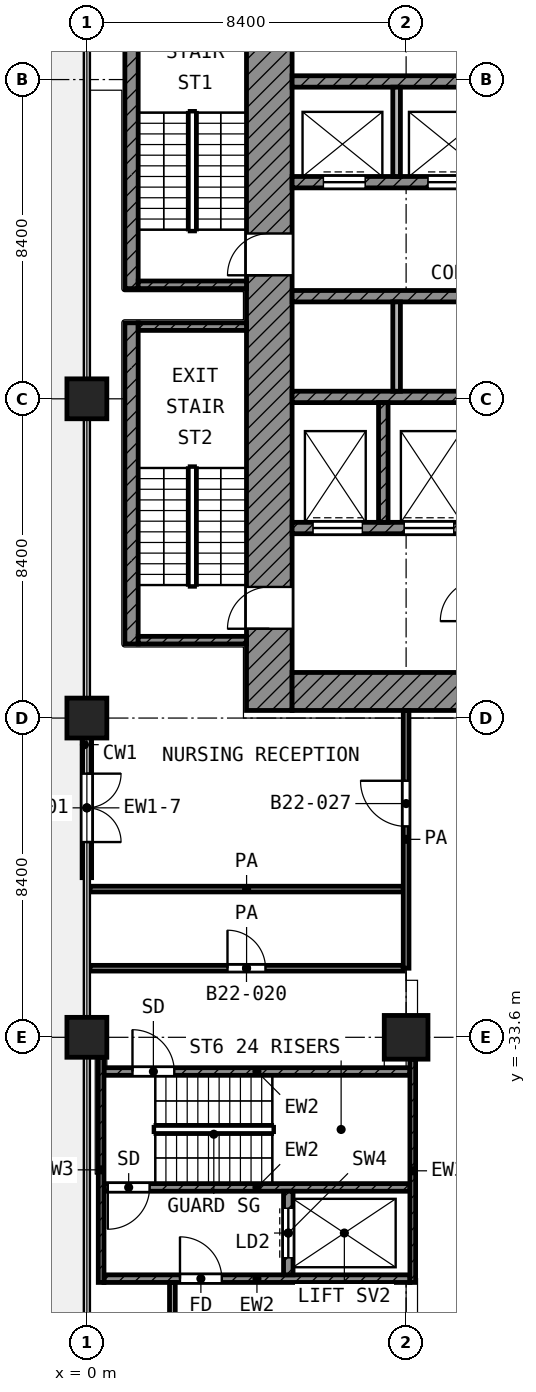
"""IFC4 building model, lengths in metres.
Left out: names, types, materials, properties, quantities, classifications, styles, units other than length and angle.
Written with IfcOpenShell. Run it as: python <this file> out.ifc"""

import sys

from ifc_helpers import new_model, si_unit, direction, frame, frame_2d, origin, origin_2d, place, context, subcontext, project, spatial, rectangle, extrude, element, fill, save


model = new_model("IFC4")
c1 = context("Model", 3, precision=1e-05, world=origin(), true_north=direction((0.0, 1.0)))
c2 = subcontext(c1, "Body", "Model", "MODEL_VIEW")
j1 = project(units=[si_unit("LENGTHUNIT", "METRE"), si_unit("PLANEANGLEUNIT", "RADIAN")], contexts=[c1])
p1 = place(None, origin())
s1 = spatial("IfcSite", under=j1, at=p1, CompositionType="ELEMENT")
p2 = place(p1, origin())
s2 = spatial("IfcBuilding", under=s1, at=p2, CompositionType="ELEMENT")
p3 = place(p2, frame((0.0, 0.0, 98.8)))
s3 = spatial("IfcBuildingStorey", under=s2, at=p3, CompositionType="ELEMENT", Elevation=98.8)
for number, where, z_axis, x_axis in (
    (1, (0.0, -16.8, 0.0), (0.0, 0.0, 1.0), (1.0, 0.0, 0.0)),
    (2, (0.0, -25.2, 0.0), (0.0, 0.0, 1.0), (1.0, 0.0, 0.0)),
    (3, (0.0, -33.6, 0.0), (0.0, 0.0, 1.0), (1.0, 0.0, 0.0)),
):
    element("IfcColumn", number, at=place(p3, frame(where, z_axis=z_axis, x_axis=x_axis)), inside=s3, PredefinedType="COLUMN", context=c2, shape_type="SweptSolid", body=[
        extrude(rectangle(XDim=1.05, YDim=1.05, at=origin_2d()), origin(), (0.0, 0.0, 1.0), 4.2),
    ])
p4 = place(p3, frame((8.4, -33.6, 0.0), z_axis=(0.0, 0.0, 1.0), x_axis=(1.0, 0.0, 0.0)))
e4 = element("IfcColumn", 4, at=p4, inside=s3, PredefinedType="COLUMN", context=c2, shape_type="SweptSolid", body=[
    extrude(rectangle(XDim=1.15, YDim=1.15, at=origin_2d()), origin(), (0.0, 0.0, 1.0), 4.2),
])
p5 = place(p3, frame((0.0, -25.725, 0.0), z_axis=(0.0, 0.0, 1.0), x_axis=(0.0, -1.0, 0.0)))
e5 = element("IfcWall", 5, at=p5, inside=s3, PredefinedType="SOLIDWALL", context=c2, shape_type="SweptSolid", body=[
    extrude(rectangle(XDim=3.675, YDim=0.25, at=frame_2d((1.837, 0.0))), origin(), (0.0, 0.0, 1.0), 3.48),
])
p6 = place(p5, frame((0.938, 0.0, 0.0)))
e6 = element("IfcOpeningElement", 6, at=p6, cuts=e5, PredefinedType="OPENING", context=c2, shape_type="SweptSolid", body=[
    extrude(rectangle(XDim=1.8, YDim=2.1, at=frame_2d((0.9, 1.05))), frame((0.0, 0.135, 0.0), z_axis=(0.0, -1.0, 0.0), x_axis=(1.0, 0.0, 0.0)), (0.0, 0.0, 1.0), 0.27),
])
p7 = place(p3, frame((4.8, -25.0, 0.0), z_axis=(0.0, 0.0, 1.0), x_axis=(0.0, 1.0, 0.0)))
e7 = element("IfcWall", 7, at=p7, inside=s3, PredefinedType="SHEAR", context=c2, shape_type="SweptSolid", body=[
    extrude(rectangle(XDim=19.6, YDim=1.2, at=frame_2d((9.8, 0.0))), origin(), (0.0, 0.0, 1.0), 3.6),
])
p8 = place(p7, frame((11.45, 0.0, 0.0)))
e8 = element("IfcOpeningElement", 8, at=p8, cuts=e7, PredefinedType="OPENING", context=c2, shape_type="SweptSolid", body=[
    extrude(rectangle(XDim=1.1, YDim=2.1, at=frame_2d((0.55, 1.05))), frame((0.0, 0.61, 0.0), z_axis=(0.0, -1.0, 0.0), x_axis=(1.0, 0.0, 0.0)), (0.0, 0.0, 1.0), 1.22),
])
p9 = place(p7, frame((2.15, 0.0, 0.0)))
e9 = element("IfcOpeningElement", 9, at=p9, cuts=e7, PredefinedType="OPENING", context=c2, shape_type="SweptSolid", body=[
    extrude(rectangle(XDim=1.1, YDim=2.1, at=frame_2d((0.55, 1.05))), frame((0.0, 0.61, 0.0), z_axis=(0.0, -1.0, 0.0), x_axis=(1.0, 0.0, 0.0)), (0.0, 0.0, 1.0), 1.22),
])
p10 = place(p3, frame((5.4, -24.5, 0.0), z_axis=(0.0, 0.0, 1.0), x_axis=(1.0, 0.0, 0.0)))
e10 = element("IfcWall", 10, at=p10, inside=s3, PredefinedType="SHEAR", context=c2, shape_type="SweptSolid", body=[
    extrude(rectangle(XDim=18.6, YDim=1.0, at=frame_2d((9.3, 0.0))), origin(), (0.0, 0.0, 1.0), 3.6),
])
p11 = place(p10, frame((6.3, 0.0, 0.0)))
e11 = element("IfcOpeningElement", 11, at=p11, cuts=e10, PredefinedType="OPENING", context=c2, shape_type="SweptSolid", body=[
    extrude(rectangle(XDim=1.8, YDim=2.1, at=frame_2d((0.9, 1.05))), frame((0.0, 0.51, 0.0), z_axis=(0.0, -1.0, 0.0), x_axis=(1.0, 0.0, 0.0)), (0.0, 0.0, 1.0), 1.02),
])
p12 = place(p3, frame((5.4, -8.45, 0.0), z_axis=(0.0, 0.0, 1.0), x_axis=(1.0, 0.0, 0.0)))
e12 = element("IfcWall", 12, at=p12, inside=s3, PredefinedType="SHEAR", context=c2, shape_type="SweptSolid", body=[
    extrude(rectangle(XDim=16.65, YDim=0.3, at=frame_2d((8.325, 0.0))), origin(), (0.0, 0.0, 1.0), 3.6),
])
p13 = place(p3, frame((5.4, -11.1, 0.0), z_axis=(0.0, 0.0, 1.0), x_axis=(1.0, 0.0, 0.0)))
e13 = element("IfcWall", 13, at=p13, inside=s3, PredefinedType="SHEAR", context=c2, shape_type="SweptSolid", body=[
    extrude(rectangle(XDim=16.65, YDim=0.3, at=frame_2d((8.325, 0.0))), origin(), (0.0, 0.0, 1.0), 3.6),
])
p14 = place(p13, frame((0.825, 0.0, 0.0)))
e14 = element("IfcOpeningElement", 14, at=p14, cuts=e13, PredefinedType="OPENING", context=c2, shape_type="SweptSolid", body=[
    extrude(rectangle(XDim=1.1, YDim=2.1, at=frame_2d((0.55, 1.05))), frame((0.0, 0.16, 0.0), z_axis=(0.0, -1.0, 0.0), x_axis=(1.0, 0.0, 0.0)), (0.0, 0.0, 1.0), 0.32),
])
p15 = place(p13, frame((3.575, 0.0, 0.0)))
e15 = element("IfcOpeningElement", 15, at=p15, cuts=e13, PredefinedType="OPENING", context=c2, shape_type="SweptSolid", body=[
    extrude(rectangle(XDim=1.1, YDim=2.1, at=frame_2d((0.55, 1.05))), frame((0.0, 0.16, 0.0), z_axis=(0.0, -1.0, 0.0), x_axis=(1.0, 0.0, 0.0)), (0.0, 0.0, 1.0), 0.32),
])
p16 = place(p13, frame((6.325, 0.0, 0.0)))
e16 = element("IfcOpeningElement", 16, at=p16, cuts=e13, PredefinedType="OPENING", context=c2, shape_type="SweptSolid", body=[
    extrude(rectangle(XDim=1.1, YDim=2.1, at=frame_2d((0.55, 1.05))), frame((0.0, 0.16, 0.0), z_axis=(0.0, -1.0, 0.0), x_axis=(1.0, 0.0, 0.0)), (0.0, 0.0, 1.0), 0.32),
])
p17 = place(p13, frame((9.075, 0.0, 0.0)))
e17 = element("IfcOpeningElement", 17, at=p17, cuts=e13, PredefinedType="OPENING", context=c2, shape_type="SweptSolid", body=[
    extrude(rectangle(XDim=1.1, YDim=2.1, at=frame_2d((0.55, 1.05))), frame((0.0, 0.16, 0.0), z_axis=(0.0, -1.0, 0.0), x_axis=(1.0, 0.0, 0.0)), (0.0, 0.0, 1.0), 0.32),
])
for number, where, z_axis, x_axis in (
    (18, (5.4, -14.1, 0.0), (0.0, 0.0, 1.0), (1.0, 0.0, 0.0)),
    (19, (5.4, -16.75, 0.0), (0.0, 0.0, 1.0), (1.0, 0.0, 0.0)),
):
    element("IfcWall", number, at=place(p3, frame(where, z_axis=z_axis, x_axis=x_axis)), inside=s3, PredefinedType="SHEAR", context=c2, shape_type="SweptSolid", body=[
        extrude(rectangle(XDim=16.65, YDim=0.3, at=frame_2d((8.325, 0.0))), origin(), (0.0, 0.0, 1.0), 3.6),
    ])
p18 = place(p3, frame((5.4, -20.2, 0.0), z_axis=(0.0, 0.0, 1.0), x_axis=(1.0, 0.0, 0.0)))
e20 = element("IfcWall", 20, at=p18, inside=s3, PredefinedType="SHEAR", context=c2, shape_type="SweptSolid", body=[
    extrude(rectangle(XDim=14.65, YDim=0.3, at=frame_2d((7.325, 0.0))), origin(), (0.0, 0.0, 1.0), 3.6),
])
p19 = place(p18, frame((10.55, 0.0, 0.0)))
e21 = element("IfcOpeningElement", 21, at=p19, cuts=e20, PredefinedType="OPENING", context=c2, shape_type="SweptSolid", body=[
    extrude(rectangle(XDim=1.3, YDim=2.1, at=frame_2d((0.65, 1.05))), frame((0.0, 0.16, 0.0), z_axis=(0.0, -1.0, 0.0), x_axis=(1.0, 0.0, 0.0)), (0.0, 0.0, 1.0), 0.32),
])
p20 = place(p18, frame((12.95, 0.0, 0.0)))
e22 = element("IfcOpeningElement", 22, at=p20, cuts=e20, PredefinedType="OPENING", context=c2, shape_type="SweptSolid", body=[
    extrude(rectangle(XDim=1.3, YDim=2.1, at=frame_2d((0.65, 1.05))), frame((0.0, 0.16, 0.0), z_axis=(0.0, -1.0, 0.0), x_axis=(1.0, 0.0, 0.0)), (0.0, 0.0, 1.0), 0.32),
])
p21 = place(p18, frame((0.55, 0.0, 0.0)))
e23 = element("IfcOpeningElement", 23, at=p21, cuts=e20, PredefinedType="OPENING", context=c2, shape_type="SweptSolid", body=[
    extrude(rectangle(XDim=1.3, YDim=2.1, at=frame_2d((0.65, 1.05))), frame((0.0, 0.16, 0.0), z_axis=(0.0, -1.0, 0.0), x_axis=(1.0, 0.0, 0.0)), (0.0, 0.0, 1.0), 0.32),
])
p22 = place(p18, frame((2.95, 0.0, 0.0)))
e24 = element("IfcOpeningElement", 24, at=p22, cuts=e20, PredefinedType="OPENING", context=c2, shape_type="SweptSolid", body=[
    extrude(rectangle(XDim=1.3, YDim=2.1, at=frame_2d((0.65, 1.05))), frame((0.0, 0.16, 0.0), z_axis=(0.0, -1.0, 0.0), x_axis=(1.0, 0.0, 0.0)), (0.0, 0.0, 1.0), 0.32),
])
p23 = place(p18, frame((7.15, 0.0, 0.0)))
e25 = element("IfcOpeningElement", 25, at=p23, cuts=e20, PredefinedType="OPENING", context=c2, shape_type="SweptSolid", body=[
    extrude(rectangle(XDim=0.9, YDim=2.1, at=frame_2d((0.45, 1.05))), frame((0.0, 0.16, 0.0), z_axis=(0.0, -1.0, 0.0), x_axis=(1.0, 0.0, 0.0)), (0.0, 0.0, 1.0), 0.32),
])
p24 = place(p3, frame((7.8, -20.05, 0.0), z_axis=(0.0, 0.0, 1.0), x_axis=(0.0, 1.0, 0.0)))
e26 = element("IfcWall", 26, at=p24, inside=s3, PredefinedType="SHEAR", context=c2, shape_type="SweptSolid", body=[
    extrude(rectangle(XDim=3.15, YDim=0.25, at=frame_2d((1.575, 0.0))), origin(), (0.0, 0.0, 1.0), 3.6),
])
p25 = place(p3, frame((8.15, -10.95, 0.0), z_axis=(0.0, 0.0, 1.0), x_axis=(0.0, 1.0, 0.0)))
e27 = element("IfcWall", 27, at=p25, inside=s3, PredefinedType="PARTITIONING", context=c2, shape_type="SweptSolid", body=[
    extrude(rectangle(XDim=2.35, YDim=0.2, at=frame_2d((1.175, 0.0))), origin(), (0.0, 0.0, 1.0), 3.6),
])
p26 = place(p3, frame((8.15, -16.6, 0.0), z_axis=(0.0, 0.0, 1.0), x_axis=(0.0, 1.0, 0.0)))
e28 = element("IfcWall", 28, at=p26, inside=s3, PredefinedType="PARTITIONING", context=c2, shape_type="SweptSolid", body=[
    extrude(rectangle(XDim=2.35, YDim=0.2, at=frame_2d((1.175, 0.0))), origin(), (0.0, 0.0, 1.0), 3.6),
])
p27 = place(p3, frame((1.175, -13.9, 0.0), z_axis=(0.0, 0.0, 1.0), x_axis=(0.0, 1.0, 0.0)))
e29 = element("IfcWall", 29, at=p27, inside=s3, PredefinedType="SHEAR", context=c2, shape_type="SweptSolid", body=[
    extrude(rectangle(XDim=8.45, YDim=0.35, at=frame_2d((4.225, 0.0))), origin(), (0.0, 0.0, 1.0), 3.6),
])
p28 = place(p3, frame((1.35, -13.8, 0.0), z_axis=(0.0, 0.0, 1.0), x_axis=(1.0, 0.0, 0.0)))
e30 = element("IfcWall", 30, at=p28, inside=s3, PredefinedType="SHEAR", context=c2, shape_type="SweptSolid", body=[
    extrude(rectangle(XDim=2.85, YDim=0.2, at=frame_2d((1.425, 0.0))), origin(), (0.0, 0.0, 1.0), 3.6),
])
p29 = place(p3, frame((1.175, -23.25, 0.0), z_axis=(0.0, 0.0, 1.0), x_axis=(0.0, 1.0, 0.0)))
e31 = element("IfcWall", 31, at=p29, inside=s3, PredefinedType="SHEAR", context=c2, shape_type="SweptSolid", body=[
    extrude(rectangle(XDim=8.45, YDim=0.35, at=frame_2d((4.225, 0.0))), origin(), (0.0, 0.0, 1.0), 3.6),
])
for number, where, z_axis, x_axis in (
    (32, (1.35, -14.9, 0.0), (0.0, 0.0, 1.0), (1.0, 0.0, 0.0)),
    (33, (1.35, -23.15, 0.0), (0.0, 0.0, 1.0), (1.0, 0.0, 0.0)),
):
    element("IfcWall", number, at=place(p3, frame(where, z_axis=z_axis, x_axis=x_axis)), inside=s3, PredefinedType="SHEAR", context=c2, shape_type="SweptSolid", body=[
        extrude(rectangle(XDim=2.85, YDim=0.2, at=frame_2d((1.425, 0.0))), origin(), (0.0, 0.0, 1.0), 3.6),
    ])
p30 = place(p3, frame((0.375, -40.05, 0.0), z_axis=(0.0, 0.0, 1.0), x_axis=(0.0, 1.0, 0.0)))
e34 = element("IfcWall", 34, at=p30, inside=s3, PredefinedType="SHEAR", context=c2, shape_type="SweptSolid", body=[
    extrude(rectangle(XDim=5.925, YDim=0.15, at=frame_2d((2.962, 0.0))), origin(), (0.0, 0.0, 1.0), 3.6),
])
p31 = place(p3, frame((8.575, -40.05, 0.0), z_axis=(0.0, 0.0, 1.0), x_axis=(0.0, 1.0, 0.0)))
e35 = element("IfcWall", 35, at=p31, inside=s3, PredefinedType="SHEAR", context=c2, shape_type="SweptSolid", body=[
    extrude(rectangle(XDim=5.875, YDim=0.15, at=frame_2d((2.938, 0.0))), origin(), (0.0, 0.0, 1.0), 3.6),
])
p32 = place(p3, frame((0.45, -34.5, 0.0), z_axis=(0.0, 0.0, 1.0), x_axis=(1.0, 0.0, 0.0)))
e36 = element("IfcWall", 36, at=p32, inside=s3, PredefinedType="SHEAR", context=c2, shape_type="SweptSolid", body=[
    extrude(rectangle(XDim=8.05, YDim=0.2, at=frame_2d((4.025, 0.0))), origin(), (0.0, 0.0, 1.0), 3.6),
])
p33 = place(p32, frame((0.75, 0.0, 0.0)))
e37 = element("IfcOpeningElement", 37, at=p33, cuts=e36, PredefinedType="OPENING", context=c2, shape_type="SweptSolid", body=[
    extrude(rectangle(XDim=1.1, YDim=2.1, at=frame_2d((0.55, 1.05))), frame((0.0, 0.11, 0.0), z_axis=(0.0, -1.0, 0.0), x_axis=(1.0, 0.0, 0.0)), (0.0, 0.0, 1.0), 0.22),
])
p34 = place(p3, frame((0.45, -37.55, 0.0), z_axis=(0.0, 0.0, 1.0), x_axis=(1.0, 0.0, 0.0)))
e38 = element("IfcWall", 38, at=p34, inside=s3, PredefinedType="SHEAR", context=c2, shape_type="SweptSolid", body=[
    extrude(rectangle(XDim=8.05, YDim=0.2, at=frame_2d((4.025, 0.0))), origin(), (0.0, 0.0, 1.0), 3.6),
])
p35 = place(p34, frame((0.1, 0.0, 0.0)))
e39 = element("IfcOpeningElement", 39, at=p35, cuts=e38, PredefinedType="OPENING", context=c2, shape_type="SweptSolid", body=[
    extrude(rectangle(XDim=1.1, YDim=2.1, at=frame_2d((0.55, 1.05))), frame((0.0, 0.11, 0.0), z_axis=(0.0, -1.0, 0.0), x_axis=(1.0, 0.0, 0.0)), (0.0, 0.0, 1.0), 0.22),
])
p36 = place(p3, frame((0.45, -39.95, 0.0), z_axis=(0.0, 0.0, 1.0), x_axis=(1.0, 0.0, 0.0)))
e40 = element("IfcWall", 40, at=p36, inside=s3, PredefinedType="SHEAR", context=c2, shape_type="SweptSolid", body=[
    extrude(rectangle(XDim=8.05, YDim=0.2, at=frame_2d((4.025, 0.0))), origin(), (0.0, 0.0, 1.0), 3.6),
])
p37 = place(p36, frame((2.0, 0.0, 0.0)))
e41 = element("IfcOpeningElement", 41, at=p37, cuts=e40, PredefinedType="OPENING", context=c2, shape_type="SweptSolid", body=[
    extrude(rectangle(XDim=1.1, YDim=2.1, at=frame_2d((0.55, 1.05))), frame((0.0, 0.11, 0.0), z_axis=(0.0, -1.0, 0.0), x_axis=(1.0, 0.0, 0.0)), (0.0, 0.0, 1.0), 0.22),
])
p38 = place(p3, frame((5.3, -39.85, 0.0), z_axis=(0.0, 0.0, 1.0), x_axis=(0.0, 1.0, 0.0)))
e42 = element("IfcWall", 42, at=p38, inside=s3, PredefinedType="SHEAR", context=c2, shape_type="SweptSolid", body=[
    extrude(rectangle(XDim=2.2, YDim=0.25, at=frame_2d((1.1, 0.0))), origin(), (0.0, 0.0, 1.0), 3.6),
])
p39 = place(p38, frame((0.45, 0.0, 0.0)))
e43 = element("IfcOpeningElement", 43, at=p39, cuts=e42, PredefinedType="OPENING", context=c2, shape_type="SweptSolid", body=[
    extrude(rectangle(XDim=1.3, YDim=2.1, at=frame_2d((0.65, 1.05))), frame((0.0, 0.135, 0.0), z_axis=(0.0, -1.0, 0.0), x_axis=(1.0, 0.0, 0.0)), (0.0, 0.0, 1.0), 0.27),
])
p40 = place(p3, frame((0.08, -31.782, 0.0), z_axis=(0.0, 0.0, 1.0), x_axis=(1.0, 0.0, 0.0)))
e44 = element("IfcWall", 44, at=p40, inside=s3, PredefinedType="PARTITIONING", context=c2, shape_type="SweptSolid", body=[
    extrude(rectangle(XDim=8.245, YDim=0.15, at=frame_2d((4.123, 0.0))), origin(), (0.0, 0.0, 1.0), 3.6),
])
p41 = place(p40, frame((3.62, 0.0, 0.0)))
e45 = element("IfcOpeningElement", 45, at=p41, cuts=e44, PredefinedType="OPENING", context=c2, shape_type="SweptSolid", body=[
    extrude(rectangle(XDim=1.0, YDim=2.1, at=frame_2d((0.5, 1.05))), frame((0.0, 0.085, 0.0), z_axis=(0.0, -1.0, 0.0), x_axis=(1.0, 0.0, 0.0)), (0.0, 0.0, 1.0), 0.17),
])
p42 = place(p3, frame((0.08, -29.7, 0.0), z_axis=(0.0, 0.0, 1.0), x_axis=(1.0, 0.0, 0.0)))
e46 = element("IfcWall", 46, at=p42, inside=s3, PredefinedType="PARTITIONING", context=c2, shape_type="SweptSolid", body=[
    extrude(rectangle(XDim=8.245, YDim=0.15, at=frame_2d((4.123, 0.0))), origin(), (0.0, 0.0, 1.0), 3.6),
])
p43 = place(p3, frame((2.25, -42.348, 0.0), z_axis=(0.0, 0.0, 1.0), x_axis=(0.0, 1.0, 0.0)))
e47 = element("IfcWall", 47, at=p43, inside=s3, PredefinedType="PARTITIONING", context=c2, shape_type="SweptSolid", body=[
    extrude(rectangle(XDim=2.298, YDim=0.15, at=frame_2d((1.149, 0.0))), origin(), (0.0, 0.0, 1.0), 3.6),
])
p44 = place(p3, frame((8.4, -31.782, 0.0), z_axis=(0.0, 0.0, 1.0), x_axis=(0.0, 1.0, 0.0)))
e48 = element("IfcWall", 48, at=p44, inside=s3, PredefinedType="PARTITIONING", context=c2, shape_type="SweptSolid", body=[
    extrude(rectangle(XDim=6.782, YDim=0.15, at=frame_2d((3.391, 0.0))), origin(), (0.0, 0.0, 1.0), 3.6),
])
p45 = place(p44, frame((3.732, 0.0, 0.0)))
e49 = element("IfcOpeningElement", 49, at=p45, cuts=e48, PredefinedType="OPENING", context=c2, shape_type="SweptSolid", body=[
    extrude(rectangle(XDim=1.2, YDim=2.1, at=frame_2d((0.6, 1.05))), frame((0.0, 0.085, 0.0), z_axis=(0.0, -1.0, 0.0), x_axis=(1.0, 0.0, 0.0)), (0.0, 0.0, 1.0), 0.17),
])
p46 = place(p6, origin())
e50 = element("IfcDoor", 50, at=p46, inside=s3, OperationType="DOUBLE_DOOR_SINGLE_SWING", PredefinedType="DOOR", context=c2, shape_type="SweptSolid", body=[
    extrude(rectangle(XDim=1.8, YDim=2.1, at=frame_2d((0.9, 1.05))), frame((0.0, 0.025, 0.0), z_axis=(0.0, -1.0, 0.0), x_axis=(1.0, 0.0, 0.0)), (0.0, 0.0, 1.0), 0.05),
])
fill(e6, e50)
p47 = place(p14, origin())
e51 = element("IfcDoor", 51, at=p47, inside=s3, OperationType="DOUBLE_DOOR_SLIDING", PredefinedType="DOOR", context=c2, shape_type="SweptSolid", body=[
    extrude(rectangle(XDim=1.1, YDim=2.1, at=frame_2d((0.55, 1.05))), frame((0.0, 0.025, 0.0), z_axis=(0.0, -1.0, 0.0), x_axis=(1.0, 0.0, 0.0)), (0.0, 0.0, 1.0), 0.05),
])
fill(e14, e51)
p48 = place(p15, origin())
e52 = element("IfcDoor", 52, at=p48, inside=s3, OperationType="DOUBLE_DOOR_SLIDING", PredefinedType="DOOR", context=c2, shape_type="SweptSolid", body=[
    extrude(rectangle(XDim=1.1, YDim=2.1, at=frame_2d((0.55, 1.05))), frame((0.0, 0.025, 0.0), z_axis=(0.0, -1.0, 0.0), x_axis=(1.0, 0.0, 0.0)), (0.0, 0.0, 1.0), 0.05),
])
fill(e15, e52)
p49 = place(p21, origin())
e53 = element("IfcDoor", 53, at=p49, inside=s3, OperationType="DOUBLE_DOOR_SLIDING", PredefinedType="DOOR", context=c2, shape_type="SweptSolid", body=[
    extrude(rectangle(XDim=1.3, YDim=2.1, at=frame_2d((0.65, 1.05))), frame((0.0, 0.025, 0.0), z_axis=(0.0, -1.0, 0.0), x_axis=(1.0, 0.0, 0.0)), (0.0, 0.0, 1.0), 0.05),
])
fill(e23, e53)
p50 = place(p22, origin())
e54 = element("IfcDoor", 54, at=p50, inside=s3, OperationType="DOUBLE_DOOR_SLIDING", PredefinedType="DOOR", context=c2, shape_type="SweptSolid", body=[
    extrude(rectangle(XDim=1.3, YDim=2.1, at=frame_2d((0.65, 1.05))), frame((0.0, 0.025, 0.0), z_axis=(0.0, -1.0, 0.0), x_axis=(1.0, 0.0, 0.0)), (0.0, 0.0, 1.0), 0.05),
])
fill(e24, e54)
p51 = place(p8, origin())
e55 = element("IfcDoor", 55, at=p51, inside=s3, OperationType="SINGLE_SWING_LEFT", PredefinedType="DOOR", context=c2, shape_type="SweptSolid", body=[
    extrude(rectangle(XDim=1.1, YDim=2.1, at=frame_2d((0.55, 1.05))), frame((0.0, 0.025, 0.0), z_axis=(0.0, -1.0, 0.0), x_axis=(1.0, 0.0, 0.0)), (0.0, 0.0, 1.0), 0.05),
])
fill(e8, e55)
p52 = place(p9, origin())
e56 = element("IfcDoor", 56, at=p52, inside=s3, OperationType="SINGLE_SWING_LEFT", PredefinedType="DOOR", context=c2, shape_type="SweptSolid", body=[
    extrude(rectangle(XDim=1.1, YDim=2.1, at=frame_2d((0.55, 1.05))), frame((0.0, 0.025, 0.0), z_axis=(0.0, -1.0, 0.0), x_axis=(1.0, 0.0, 0.0)), (0.0, 0.0, 1.0), 0.05),
])
fill(e9, e56)
p53 = place(p33, origin())
e57 = element("IfcDoor", 57, at=p53, inside=s3, OperationType="SINGLE_SWING_LEFT", PredefinedType="DOOR", context=c2, shape_type="SweptSolid", body=[
    extrude(rectangle(XDim=1.1, YDim=2.1, at=frame_2d((0.55, 1.05))), frame((0.0, 0.025, 0.0), z_axis=(0.0, -1.0, 0.0), x_axis=(1.0, 0.0, 0.0)), (0.0, 0.0, 1.0), 0.05),
])
fill(e37, e57)
p54 = place(p35, frame((1.1, 0.0, 0.0), z_axis=(0.0, 0.0, 1.0), x_axis=(-1.0, 0.0, 0.0)))
e58 = element("IfcDoor", 58, at=p54, inside=s3, OperationType="SINGLE_SWING_LEFT", PredefinedType="DOOR", context=c2, shape_type="SweptSolid", body=[
    extrude(rectangle(XDim=1.1, YDim=2.1, at=frame_2d((0.55, 1.05))), frame((0.0, 0.025, 0.0), z_axis=(0.0, -1.0, 0.0), x_axis=(1.0, 0.0, 0.0)), (0.0, 0.0, 1.0), 0.05),
])
fill(e39, e58)
p55 = place(p39, origin())
e59 = element("IfcDoor", 59, at=p55, inside=s3, OperationType="DOUBLE_DOOR_SLIDING", PredefinedType="DOOR", context=c2, shape_type="SweptSolid", body=[
    extrude(rectangle(XDim=1.3, YDim=2.1, at=frame_2d((0.65, 1.05))), frame((0.0, 0.025, 0.0), z_axis=(0.0, -1.0, 0.0), x_axis=(1.0, 0.0, 0.0)), (0.0, 0.0, 1.0), 0.05),
])
fill(e43, e59)
p56 = place(p37, origin())
e60 = element("IfcDoor", 60, at=p56, inside=s3, OperationType="SINGLE_SWING_LEFT", PredefinedType="DOOR", context=c2, shape_type="SweptSolid", body=[
    extrude(rectangle(XDim=1.1, YDim=2.1, at=frame_2d((0.55, 1.05))), frame((0.0, 0.025, 0.0), z_axis=(0.0, -1.0, 0.0), x_axis=(1.0, 0.0, 0.0)), (0.0, 0.0, 1.0), 0.05),
])
fill(e41, e60)
p57 = place(p45, origin())
e61 = element("IfcDoor", 61, at=p57, inside=s3, OperationType="SINGLE_SWING_RIGHT", PredefinedType="DOOR", context=c2, shape_type="SweptSolid", body=[
    extrude(rectangle(XDim=1.2, YDim=2.1, at=frame_2d((0.6, 1.05))), frame((0.0, 0.025, 0.0), z_axis=(0.0, -1.0, 0.0), x_axis=(1.0, 0.0, 0.0)), (0.0, 0.0, 1.0), 0.05),
])
fill(e49, e61)
p58 = place(p41, origin())
e62 = element("IfcDoor", 62, at=p58, inside=s3, OperationType="SINGLE_SWING_LEFT", PredefinedType="DOOR", context=c2, shape_type="SweptSolid", body=[
    extrude(rectangle(XDim=1.0, YDim=2.1, at=frame_2d((0.5, 1.05))), frame((0.0, 0.025, 0.0), z_axis=(0.0, -1.0, 0.0), x_axis=(1.0, 0.0, 0.0)), (0.0, 0.0, 1.0), 0.05),
])
fill(e45, e62)
save(model, sys.argv[1])
